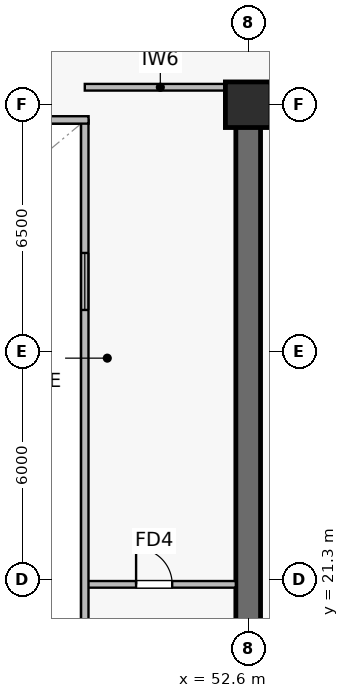
"""IFC4 building model, lengths in metres.
Left out: names, types, materials, properties, quantities, classifications, styles, units other than length and angle.
Written with IfcOpenShell. Run it as: python <this file> out.ifc"""

import sys

from ifc_helpers import new_model, si_unit, direction, frame, frame_2d, origin, origin_2d, place, context, subcontext, project, spatial, rectangle, extrude, source, transform, mapped, element, fill, save


model = new_model("IFC4")
c1 = context("Model", 3, precision=1e-05, world=origin(), true_north=direction((0.0, 1.0)))
c2 = subcontext(c1, "Body", "Model", "MODEL_VIEW")
j1 = project(units=[si_unit("LENGTHUNIT", "METRE"), si_unit("PLANEANGLEUNIT", "RADIAN")], contexts=[c1])
p1 = place(None, origin())
s1 = spatial("IfcSite", under=j1, at=p1, CompositionType="ELEMENT")
p2 = place(p1, origin())
s2 = spatial("IfcBuilding", under=s1, at=p2, CompositionType="ELEMENT")
p3 = place(p2, frame((0.0, 0.0, 109.2)))
s3 = spatial("IfcBuildingStorey", under=s2, at=p3, CompositionType="ELEMENT", Elevation=109.2)
p4 = place(p3, frame((52.275, 33.8, 0.0), z_axis=(0.0, 0.0, 1.0), x_axis=(1.0, 0.0, 0.0)))
e1 = element("IfcWall", 1, at=p4, inside=s3, PredefinedType="SHEAR", context=c2, shape_type="SweptSolid", body=[
    extrude(rectangle(XDim=15.45, YDim=0.65, at=frame_2d((7.725, 0.0))), origin(), (0.0, 0.0, 1.0), 3.79),
])
p5 = place(p4, frame((6.125, 0.0, 0.0)))
e2 = element("IfcOpeningElement", 2, at=p5, cuts=e1, PredefinedType="OPENING", context=c2, shape_type="SweptSolid", body=[
    extrude(rectangle(XDim=0.95, YDim=2.15, at=frame_2d((0.475, 1.075))), frame((0.0, 0.335, 0.0), z_axis=(0.0, -1.0, 0.0), x_axis=(1.0, 0.0, 0.0)), (0.0, 0.0, 1.0), 0.67),
])
p6 = place(p4, frame((2.585, 0.0, 0.0)))
e3 = element("IfcOpeningElement", 3, at=p6, cuts=e1, PredefinedType="OPENING", context=c2, shape_type="SweptSolid", body=[
    extrude(rectangle(XDim=0.95, YDim=2.15, at=frame_2d((0.475, 1.075))), frame((0.0, 0.335, 0.0), z_axis=(0.0, -1.0, 0.0), x_axis=(1.0, 0.0, 0.0)), (0.0, 0.0, 1.0), 0.67),
])
p7 = place(p3, frame((52.6, 15.125, 0.0), z_axis=(0.0, 0.0, 1.0), x_axis=(0.0, 1.0, 0.0)))
e4 = element("IfcWall", 4, at=p7, inside=s3, PredefinedType="SHEAR", context=c2, shape_type="SweptSolid", body=[
    extrude(rectangle(XDim=18.35, YDim=0.65, at=frame_2d((9.175, 0.0))), origin(), (0.0, 0.0, 1.0), 3.79),
])
p8 = place(p7, frame((3.425, 0.0, 0.0)))
e5 = element("IfcOpeningElement", 5, at=p8, cuts=e4, PredefinedType="OPENING", context=c2, shape_type="SweptSolid", body=[
    extrude(rectangle(XDim=1.42, YDim=2.2, at=frame_2d((0.71, 1.1))), frame((0.0, 0.335, 0.0), z_axis=(0.0, -1.0, 0.0), x_axis=(1.0, 0.0, 0.0)), (0.0, 0.0, 1.0), 0.67),
])
m1 = source(origin(), c2, "Body", "SweptSolid", [
    extrude(rectangle(XDim=1.2, YDim=1.2, at=origin_2d()), origin(), (0.0, 0.0, 1.0), 4.1),
])
p9 = place(p3, frame((52.6, 33.8, 0.0), z_axis=(0.0, 0.0, 1.0), x_axis=(1.0, 0.0, 0.0)))
e6 = element("IfcColumn", 6, at=p9, inside=s3, PredefinedType="COLUMN", context=c2, shape_type="MappedRepresentation", body=[
    mapped(m1, transform((0.0, 0.0, 0.0), scale=1.0)),
])
p10 = place(p3, frame((48.3, 34.26, 0.0), z_axis=(0.0, 0.0, 1.0), x_axis=(1.0, 0.0, 0.0)))
e7 = element("IfcWall", 7, at=p10, inside=s3, PredefinedType="PARTITIONING", context=c2, shape_type="SweptSolid", body=[
    extrude(rectangle(XDim=3.975, YDim=0.175, at=frame_2d((1.987, 0.0))), origin(), (0.0, 0.0, 1.0), 3.475),
])
p11 = place(p3, frame((48.3, 21.18, 0.0), z_axis=(0.0, 0.0, 1.0), x_axis=(1.0, 0.0, 0.0)))
e8 = element("IfcWall", 8, at=p11, inside=s3, PredefinedType="PARTITIONING", context=c2, shape_type="SweptSolid", body=[
    extrude(rectangle(XDim=3.975, YDim=0.175, at=frame_2d((1.987, 0.0))), origin(), (0.0, 0.0, 1.0), 3.79),
])
p12 = place(p11, frame((1.35, 0.0, 0.0)))
e9 = element("IfcOpeningElement", 9, at=p12, cuts=e8, PredefinedType="OPENING", context=c2, shape_type="SweptSolid", body=[
    extrude(rectangle(XDim=0.95, YDim=2.15, at=frame_2d((0.475, 1.075))), frame((0.0, 0.098, 0.0), z_axis=(0.0, -1.0, 0.0), x_axis=(1.0, 0.0, 0.0)), (0.0, 0.0, 1.0), 0.195),
])
p13 = place(p3, frame((48.3, 15.2, 0.0), z_axis=(0.0, 0.0, 1.0), x_axis=(0.0, 1.0, 0.0)))
e10 = element("IfcWall", 10, at=p13, inside=s3, PredefinedType="SOLIDWALL", context=c2, shape_type="SweptSolid", body=[
    extrude(rectangle(XDim=18.2, YDim=0.195, at=frame_2d((9.1, 0.0))), origin(), (0.0, 0.0, 1.0), 3.79),
])
p14 = place(p13, frame((1.8, 0.0, 0.9)))
e11 = element("IfcOpeningElement", 11, at=p14, cuts=e10, PredefinedType="OPENING", context=c2, shape_type="SweptSolid", body=[
    extrude(rectangle(XDim=1.5, YDim=1.4, at=frame_2d((0.75, 0.7))), frame((0.0, 0.107, 0.0), z_axis=(0.0, -1.0, 0.0), x_axis=(1.0, 0.0, 0.0)), (0.0, 0.0, 1.0), 0.215),
])
p15 = place(p13, frame((13.2, 0.0, 0.9)))
e12 = element("IfcOpeningElement", 12, at=p15, cuts=e10, PredefinedType="OPENING", context=c2, shape_type="SweptSolid", body=[
    extrude(rectangle(XDim=1.5, YDim=1.4, at=frame_2d((0.75, 0.7))), frame((0.0, 0.107, 0.0), z_axis=(0.0, -1.0, 0.0), x_axis=(1.0, 0.0, 0.0)), (0.0, 0.0, 1.0), 0.215),
])
p16 = place(p3, frame((26.4, 33.4, 0.0), z_axis=(0.0, 0.0, 1.0), x_axis=(1.0, 0.0, 0.0)))
e13 = element("IfcWall", 13, at=p16, inside=s3, PredefinedType="SOLIDWALL", context=c2, shape_type="SweptSolid", body=[
    extrude(rectangle(XDim=22.0, YDim=0.195, at=frame_2d((11.0, 0.0))), origin(), (0.0, 0.0, 1.0), 3.79),
])
m2 = source(origin(), c2, "Body", "SweptSolid", [
    extrude(rectangle(XDim=1.5, YDim=1.4, at=frame_2d((0.75, 0.7))), frame((0.0, 0.03, 0.0), z_axis=(0.0, -1.0, 0.0), x_axis=(1.0, 0.0, 0.0)), (0.0, 0.0, 1.0), 0.06),
])
p17 = place(p15, origin())
e14 = element("IfcWindow", 14, at=p17, inside=s3, PartitioningType="SINGLE_PANEL", PredefinedType="WINDOW", context=c2, shape_type="MappedRepresentation", body=[
    mapped(m2, transform((0.0, 0.0, 0.0), scale=1.0)),
])
fill(e12, e14)
m3 = source(origin(), c2, "Body", "SweptSolid", [
    extrude(rectangle(XDim=0.95, YDim=2.15, at=frame_2d((0.475, 1.075))), frame((0.0, 0.025, 0.0), z_axis=(0.0, -1.0, 0.0), x_axis=(1.0, 0.0, 0.0)), (0.0, 0.0, 1.0), 0.05),
])
p18 = place(p12, origin())
e15 = element("IfcDoor", 15, at=p18, inside=s3, OperationType="SINGLE_SWING_LEFT", PredefinedType="DOOR", context=c2, shape_type="MappedRepresentation", body=[
    mapped(m3, transform((0.0, 0.0, 0.0), scale=1.0)),
])
fill(e9, e15)
save(model, sys.argv[1])
